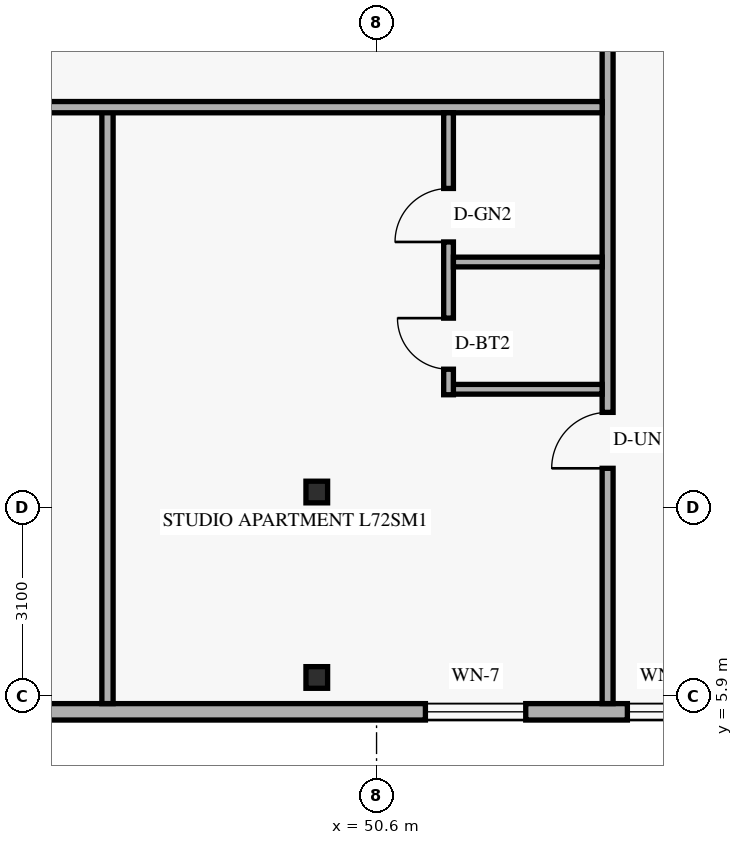
"""IFC4 building model, lengths in metres.
Left out: names, types, materials, properties, quantities, classifications, styles, units other than length and angle.
Written with IfcOpenShell. Run it as: python <this file> out.ifc"""

import sys

from ifc_helpers import new_model, si_unit, direction, frame, frame_2d, origin, origin_2d, place, context, subcontext, project, spatial, rectangle, hollow_rectangle, extrude, element, fill, save


model = new_model("IFC4")
c1 = context("Model", 3, precision=1e-05, world=origin(), true_north=direction((0.0, 1.0)))
c2 = subcontext(c1, "Body", "Model", "MODEL_VIEW")
j1 = project(units=[si_unit("LENGTHUNIT", "METRE"), si_unit("PLANEANGLEUNIT", "RADIAN")], contexts=[c1])
p1 = place(None, origin())
s1 = spatial("IfcSite", under=j1, at=p1, CompositionType="ELEMENT")
p2 = place(p1, origin())
s2 = spatial("IfcBuilding", under=s1, at=p2, CompositionType="ELEMENT")
p3 = place(p2, frame((0.0, 0.0, 274.8)))
s3 = spatial("IfcBuildingStorey", under=s2, at=p3, CompositionType="ELEMENT", Elevation=274.8)
for number, where, z_axis, x_axis in (
    (1, (49.554, 6.2, 0.0), (0.035, 0.0, 0.999), (0.0, 1.0, 0.0)),
    (2, (49.554, 9.25, 0.0), (0.035, 0.0, 0.999), (0.0, 1.0, 0.0)),
):
    element("IfcColumn", number, at=place(p3, frame(where, z_axis=z_axis, x_axis=x_axis)), inside=s3, PredefinedType="COLUMN", context=c2, shape_type="SweptSolid", body=[
        extrude(hollow_rectangle(XDim=0.356, YDim=0.356, WallThickness=0.016, at=origin_2d()), origin(), (0.0, 0.0, 1.0), 3.602),
    ])
p4 = place(p3, frame((25.82, 5.635, 0.0), z_axis=(0.0, 0.0, 1.0), x_axis=(1.0, 0.0, 0.0)))
e3 = element("IfcWall", 3, at=p4, inside=s3, PredefinedType="SOLIDWALL", context=c2, shape_type="SweptSolid", body=[
    extrude(rectangle(XDim=32.96, YDim=0.27, at=frame_2d((16.48, 0.0))), origin(), (0.0, 0.0, 1.0), 3.36),
])
p5 = place(p4, frame((14.262, 0.0, 0.85)))
e4 = element("IfcOpeningElement", 4, at=p5, cuts=e3, PredefinedType="OPENING", context=c2, shape_type="SweptSolid", body=[
    extrude(rectangle(XDim=1.65, YDim=1.6, at=frame_2d((0.825, 0.8))), frame((0.0, 0.145, 0.0), z_axis=(0.0, -1.0, 0.0), x_axis=(1.0, 0.0, 0.0)), (0.0, 0.0, 1.0), 0.29),
])
p6 = place(p4, frame((25.583, 0.0, 0.85)))
e5 = element("IfcOpeningElement", 5, at=p6, cuts=e3, PredefinedType="OPENING", context=c2, shape_type="SweptSolid", body=[
    extrude(rectangle(XDim=1.65, YDim=1.6, at=frame_2d((0.825, 0.8))), frame((0.0, 0.145, 0.0), z_axis=(0.0, -1.0, 0.0), x_axis=(1.0, 0.0, 0.0)), (0.0, 0.0, 1.0), 0.29),
])
p7 = place(p4, frame((28.905, 0.0, 0.85)))
e6 = element("IfcOpeningElement", 6, at=p7, cuts=e3, PredefinedType="OPENING", context=c2, shape_type="SweptSolid", body=[
    extrude(rectangle(XDim=1.2, YDim=1.5, at=frame_2d((0.6, 0.75))), frame((0.0, 0.145, 0.0), z_axis=(0.0, -1.0, 0.0), x_axis=(1.0, 0.0, 0.0)), (0.0, 0.0, 1.0), 0.29),
])
p8 = place(p4, frame((30.835, 0.0, 0.85)))
e7 = element("IfcOpeningElement", 7, at=p8, cuts=e3, PredefinedType="OPENING", context=c2, shape_type="SweptSolid", body=[
    extrude(rectangle(XDim=1.2, YDim=1.5, at=frame_2d((0.6, 0.75))), frame((0.0, 0.145, 0.0), z_axis=(0.0, -1.0, 0.0), x_axis=(1.0, 0.0, 0.0)), (0.0, 0.0, 1.0), 0.29),
])
p9 = place(p3, frame((54.4, 5.77, 0.0), z_axis=(0.0, 0.0, 1.0), x_axis=(0.0, 1.0, 0.0)))
e8 = element("IfcWall", 8, at=p9, inside=s3, PredefinedType="STANDARD", context=c2, shape_type="SweptSolid", body=[
    extrude(rectangle(XDim=14.63, YDim=0.18, at=frame_2d((7.315, 0.0))), origin(), (0.0, 0.0, 1.0), 2.803),
])
p10 = place(p9, frame((3.87, 0.0, 0.0)))
e9 = element("IfcOpeningElement", 9, at=p10, cuts=e8, PredefinedType="OPENING", context=c2, shape_type="SweptSolid", body=[
    extrude(rectangle(XDim=0.92, YDim=2.15, at=frame_2d((0.46, 1.075))), frame((0.0, 0.1, 0.0), z_axis=(0.0, -1.0, 0.0), x_axis=(1.0, 0.0, 0.0)), (0.0, 0.0, 1.0), 0.2),
])
p11 = place(p3, frame((46.175, 5.77, 0.0), z_axis=(0.0, 0.0, 1.0), x_axis=(0.0, 1.0, 0.0)))
e10 = element("IfcWall", 10, at=p11, inside=s3, PredefinedType="PARTITIONING", context=c2, shape_type="SweptSolid", body=[
    extrude(rectangle(XDim=9.81, YDim=0.185, at=frame_2d((4.905, 0.0))), origin(), (0.0, 0.0, 1.0), 2.803),
])
p12 = place(p3, frame((38.022, 15.58, 0.0), z_axis=(0.0, 0.0, 1.0), x_axis=(1.0, 0.0, 0.0)))
e11 = element("IfcWall", 11, at=p12, inside=s3, PredefinedType="PARTITIONING", context=c2, shape_type="SweptSolid", body=[
    extrude(rectangle(XDim=16.288, YDim=0.185, at=frame_2d((8.144, 0.0))), origin(), (0.0, 0.0, 1.0), 2.803),
])
p13 = place(p3, frame((51.704, 10.94, 0.0), z_axis=(0.0, 0.0, 1.0), x_axis=(1.0, 0.0, 0.0)))
e12 = element("IfcWall", 12, at=p13, inside=s3, PredefinedType="PLUMBINGWALL", context=c2, shape_type="SweptSolid", body=[
    extrude(rectangle(XDim=2.606, YDim=0.16, at=frame_2d((1.303, 0.0))), origin(), (0.0, 0.0, 1.0), 3.36),
])
p14 = place(p3, frame((51.784, 10.85, 0.0), z_axis=(0.0, 0.0, 1.0), x_axis=(0.0, 1.0, 0.0)))
e13 = element("IfcWall", 13, at=p14, inside=s3, PredefinedType="PLUMBINGWALL", context=c2, shape_type="SweptSolid", body=[
    extrude(rectangle(XDim=4.637, YDim=0.16, at=frame_2d((2.319, 0.0))), origin(), (0.0, 0.0, 1.0), 3.039),
])
p15 = place(p14, frame((0.42, 0.0, 0.0)))
e14 = element("IfcOpeningElement", 14, at=p15, cuts=e13, PredefinedType="OPENING", context=c2, shape_type="SweptSolid", body=[
    extrude(rectangle(XDim=0.84, YDim=2.12, at=frame_2d((0.42, 1.06))), frame((0.0, 0.09, 0.0), z_axis=(0.0, -1.0, 0.0), x_axis=(1.0, 0.0, 0.0)), (0.0, 0.0, 1.0), 0.18),
])
p16 = place(p14, frame((2.513, 0.0, 0.0)))
e15 = element("IfcOpeningElement", 15, at=p16, cuts=e13, PredefinedType="OPENING", context=c2, shape_type="SweptSolid", body=[
    extrude(rectangle(XDim=0.88, YDim=2.12, at=frame_2d((0.44, 1.06))), frame((0.0, 0.09, 0.0), z_axis=(0.0, -1.0, 0.0), x_axis=(1.0, 0.0, 0.0)), (0.0, 0.0, 1.0), 0.18),
])
p17 = place(p3, frame((51.864, 13.033, 0.0), z_axis=(0.0, 0.0, 1.0), x_axis=(1.0, 0.0, 0.0)))
e16 = element("IfcWall", 16, at=p17, inside=s3, PredefinedType="PLUMBINGWALL", context=c2, shape_type="SweptSolid", body=[
    extrude(rectangle(XDim=2.446, YDim=0.16, at=frame_2d((1.223, 0.0))), origin(), (0.0, 0.0, 1.0), 3.36),
])
p18 = place(p6, origin())
e17 = element("IfcWindow", 17, at=p18, inside=s3, PartitioningType="SINGLE_PANEL", PredefinedType="WINDOW", context=c2, shape_type="SweptSolid", body=[
    extrude(rectangle(XDim=1.65, YDim=1.6, at=frame_2d((0.825, 0.8))), frame((0.0, 0.03, 0.0), z_axis=(0.0, -1.0, 0.0), x_axis=(1.0, 0.0, 0.0)), (0.0, 0.0, 1.0), 0.06),
])
fill(e5, e17)
p19 = place(p7, origin())
e18 = element("IfcWindow", 18, at=p19, inside=s3, PartitioningType="SINGLE_PANEL", PredefinedType="WINDOW", context=c2, shape_type="SweptSolid", body=[
    extrude(rectangle(XDim=1.2, YDim=1.5, at=frame_2d((0.6, 0.75))), frame((0.0, 0.03, 0.0), z_axis=(0.0, -1.0, 0.0), x_axis=(1.0, 0.0, 0.0)), (0.0, 0.0, 1.0), 0.06),
])
fill(e6, e18)
p20 = place(p10, origin())
e19 = element("IfcDoor", 19, at=p20, inside=s3, OperationType="SINGLE_SWING_LEFT", PredefinedType="DOOR", context=c2, shape_type="SweptSolid", body=[
    extrude(rectangle(XDim=0.92, YDim=2.15, at=frame_2d((0.46, 1.075))), frame((0.0, 0.025, 0.0), z_axis=(0.0, -1.0, 0.0), x_axis=(1.0, 0.0, 0.0)), (0.0, 0.0, 1.0), 0.05),
])
fill(e9, e19)
p21 = place(p15, origin())
e20 = element("IfcDoor", 20, at=p21, inside=s3, OperationType="SINGLE_SWING_RIGHT", PredefinedType="DOOR", context=c2, shape_type="SweptSolid", body=[
    extrude(rectangle(XDim=0.84, YDim=2.12, at=frame_2d((0.42, 1.06))), frame((0.0, 0.025, 0.0), z_axis=(0.0, -1.0, 0.0), x_axis=(1.0, 0.0, 0.0)), (0.0, 0.0, 1.0), 0.05),
])
fill(e14, e20)
p22 = place(p16, origin())
e21 = element("IfcDoor", 21, at=p22, inside=s3, OperationType="SINGLE_SWING_LEFT", PredefinedType="DOOR", context=c2, shape_type="SweptSolid", body=[
    extrude(rectangle(XDim=0.88, YDim=2.12, at=frame_2d((0.44, 1.06))), frame((0.0, 0.025, 0.0), z_axis=(0.0, -1.0, 0.0), x_axis=(1.0, 0.0, 0.0)), (0.0, 0.0, 1.0), 0.05),
])
fill(e15, e21)
save(model, sys.argv[1])
